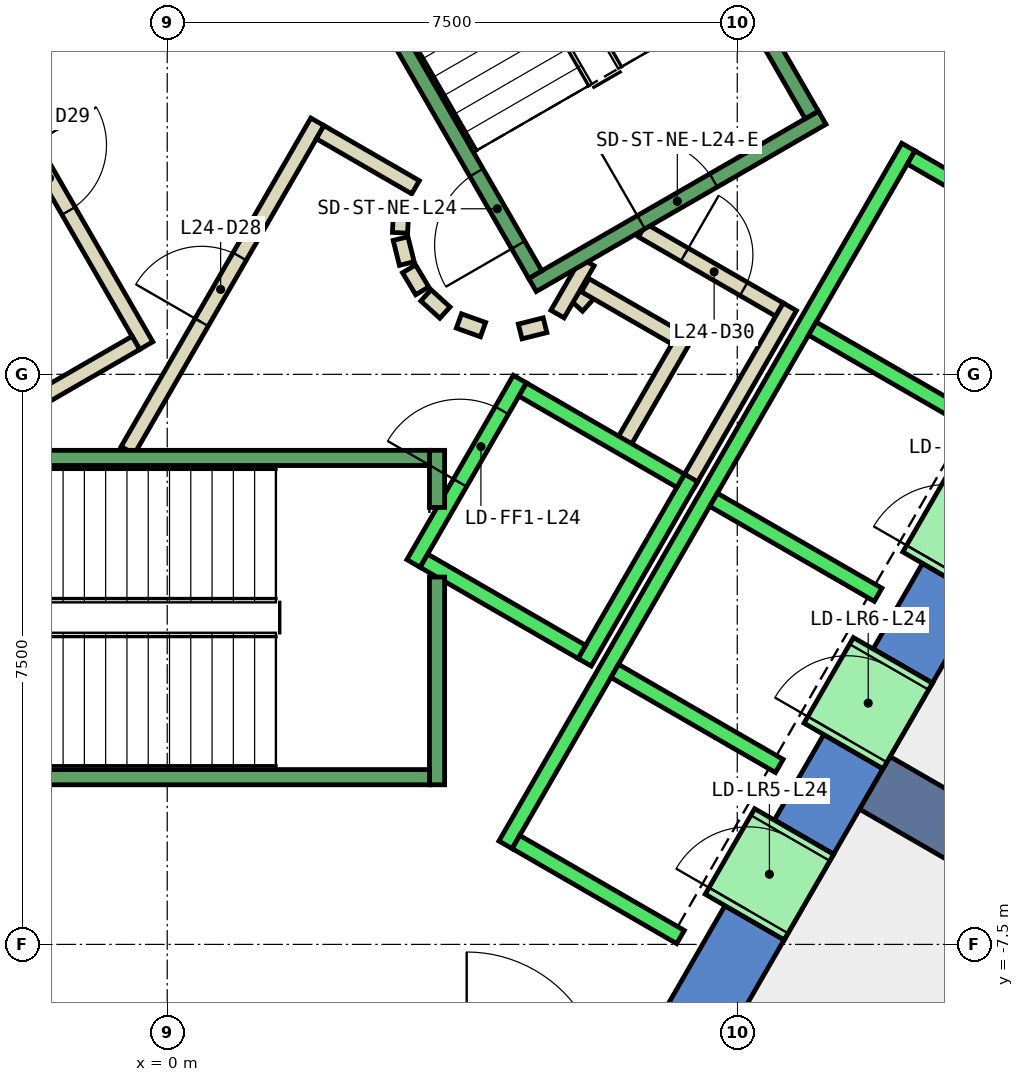
"""IFC4 building model, lengths in metres.
Left out: names, types, materials, properties, quantities, classifications, styles, units other than length and angle.
Written with IfcOpenShell. Run it as: python <this file> out.ifc"""

import sys

from ifc_helpers import new_model, si_unit, direction, frame, frame_2d, origin, place, context, subcontext, project, spatial, polyline, rectangle, outline, extrude, element, fill, save


model = new_model("IFC4")
c1 = context("Model", 3, precision=1e-05, world=origin(), true_north=direction((0.0, 1.0)))
c2 = subcontext(c1, "Body", "Model", "MODEL_VIEW")
j1 = project(units=[si_unit("LENGTHUNIT", "METRE"), si_unit("PLANEANGLEUNIT", "RADIAN")], contexts=[c1])
p1 = place(None, origin())
s1 = spatial("IfcSite", under=j1, at=p1, CompositionType="ELEMENT")
p2 = place(p1, origin())
s2 = spatial("IfcBuilding", under=s1, at=p2, CompositionType="ELEMENT")
p3 = place(p2, frame((0.0, 0.0, 111.8)))
s3 = spatial("IfcBuildingStorey", under=s2, at=p3, CompositionType="ELEMENT", Elevation=111.8)
p4 = place(p3, frame((0.0, 0.0, -0.4)))
e1 = element("IfcWall", 1, at=p4, inside=s3, PredefinedType="SHEAR", context=c2, shape_type="SweptSolid", body=[
    extrude(outline(polyline([(8.517, 11.748), (7.738, 11.298), (12.817, 2.5), (13.856, 2.5), (8.517, 11.748)])), origin(), (0.0, 0.0, 1.0), 4.2),
])
p5 = place(p3, frame((0.0, 0.0, -0.4)))
e2 = element("IfcWall", 2, at=p5, inside=s3, PredefinedType="SHEAR", context=c2, shape_type="SweptSolid", body=[
    extrude(outline(polyline([(8.117, -7.44), (7.338, -6.99), (6.409, -8.6), (6.928, -9.5), (8.117, -7.44)])), origin(), (0.0, 0.0, 1.0), 4.2),
])
p6 = place(p3, frame((0.0, 0.0, -0.4)))
e3 = element("IfcWall", 3, at=p6, inside=s3, PredefinedType="SHEAR", context=c2, shape_type="SweptSolid", body=[
    extrude(outline(polyline([(9.417, -5.189), (8.638, -4.739), (7.988, -5.864), (8.767, -6.314), (9.417, -5.189)])), origin(), (0.0, 0.0, 1.0), 4.2),
])
p7 = place(p3, frame((0.0, 0.0, -0.4)))
e4 = element("IfcWall", 4, at=p7, inside=s3, PredefinedType="SHEAR", context=c2, shape_type="SweptSolid", body=[
    extrude(outline(polyline([(10.717, -2.937), (9.938, -2.487), (9.288, -3.613), (10.067, -4.063), (10.717, -2.937)])), origin(), (0.0, 0.0, 1.0), 4.2),
])
p8 = place(p3, frame((0.0, 0.0, 3.6)))
e5 = element("IfcWall", 5, at=p8, inside=s3, PredefinedType="SHEAR", context=c2, shape_type="SweptSolid", body=[
    extrude(outline(polyline([(8.767, -6.314), (7.988, -5.864), (7.338, -6.99), (8.117, -7.44), (8.767, -6.314)])), origin(), (0.0, 0.0, 1.0), 0.2),
])
p9 = place(p3, frame((0.0, 0.0, 3.6)))
e6 = element("IfcWall", 6, at=p9, inside=s3, PredefinedType="SHEAR", context=c2, shape_type="SweptSolid", body=[
    extrude(outline(polyline([(10.067, -4.063), (9.288, -3.613), (8.638, -4.739), (9.417, -5.189), (10.067, -4.063)])), origin(), (0.0, 0.0, 1.0), 0.2),
])
p10 = place(p3, frame((0.0, 0.0, 3.6)))
e7 = element("IfcWall", 7, at=p10, inside=s3, PredefinedType="SHEAR", context=c2, shape_type="SweptSolid", body=[
    extrude(outline(polyline([(11.367, -1.811), (10.588, -1.361), (9.938, -2.487), (10.717, -2.937), (11.367, -1.811)])), origin(), (0.0, 0.0, 1.0), 0.2),
])
p11 = place(p3, frame((9.31, -5.375, -0.4), z_axis=(0.0, 0.0, 1.0), x_axis=(0.866017533419, -0.500013631625, 0.0)))
e8 = element("IfcWall", 8, at=p11, inside=s3, PredefinedType="SHEAR", context=c2, shape_type="SweptSolid", body=[
    extrude(rectangle(XDim=9.0, YDim=0.8, at=frame_2d((4.5, 0.0))), origin(), (0.0, 0.0, 1.0), 4.2),
])
p12 = place(p3, frame((5.39, 0.898, 0.0), z_axis=(0.0, 0.0, 1.0), x_axis=(0.673828488714, 0.738887791073, 0.0)))
e9 = element("IfcWall", 9, at=p12, inside=s3, PredefinedType="PARTITIONING", context=c2, shape_type="SweptSolid", body=[
    extrude(rectangle(XDim=0.263, YDim=0.2, at=frame_2d((0.131, 0.0))), origin(), (0.0, 0.0, 1.0), 3.8),
])
p13 = place(p3, frame((5.499, 1.172, 0.0), z_axis=(0.0, 0.0, 1.0), x_axis=(0.866333505267, -0.499465972466, 0.0)))
e10 = element("IfcWall", 10, at=p13, inside=s3, PredefinedType="PARTITIONING", context=c2, shape_type="SweptSolid", body=[
    extrude(rectangle(XDim=1.374, YDim=0.2, at=frame_2d((0.687, 0.0))), origin(), (0.0, 0.0, 1.0), 3.8),
])
p14 = place(p3, frame((6.826, 0.522, 0.0), z_axis=(0.0, 0.0, 1.0), x_axis=(-0.500016722714, -0.866015748706, 0.0)))
e11 = element("IfcWall", 11, at=p14, inside=s3, PredefinedType="PARTITIONING", context=c2, shape_type="SweptSolid", body=[
    extrude(rectangle(XDim=1.7, YDim=0.2, at=frame_2d((0.85, 0.0))), origin(), (0.0, 0.0, 1.0), 3.8),
])
p15 = place(p3, frame((6.25, 1.894, 0.0), z_axis=(0.0, 0.0, 1.0), x_axis=(0.866043184279, -0.499969202016, 0.0)))
e12 = element("IfcWall", 12, at=p15, inside=s3, PredefinedType="PARTITIONING", context=c2, shape_type="SweptSolid", body=[
    extrude(rectangle(XDim=2.084, YDim=0.2, at=frame_2d((1.042, 0.0))), origin(), (0.0, 0.0, 1.0), 3.8),
])
p16 = place(p15, frame((0.642, 0.0, 0.0)))
e13 = element("IfcOpeningElement", 13, at=p16, cuts=e12, PredefinedType="OPENING", context=c2, shape_type="SweptSolid", body=[
    extrude(rectangle(XDim=0.9, YDim=2.1, at=frame_2d((0.45, 1.05))), frame((0.0, 0.11, 0.0), z_axis=(0.0, -1.0, 0.0), x_axis=(1.0, 0.0, 0.0)), (0.0, 0.0, 1.0), 0.22),
])
p17 = place(p3, frame((8.192, 0.888, 0.0), z_axis=(0.0, 0.0, 1.0), x_axis=(-0.499940625693, -0.866059680843, 0.0)))
e14 = element("IfcWall", 14, at=p17, inside=s3, PredefinedType="PARTITIONING", context=c2, shape_type="SweptSolid", body=[
    extrude(rectangle(XDim=2.68, YDim=0.2, at=frame_2d((1.34, 0.0))), origin(), (0.0, 0.0, 1.0), 3.8),
])
p18 = place(p3, frame((5.135, 0.793, 0.0), z_axis=(0.0, 0.0, 1.0), x_axis=(0.499526442893, 0.866298639529, 0.0)))
e15 = element("IfcWall", 15, at=p18, inside=s3, PredefinedType="PARTITIONING", context=c2, shape_type="SweptSolid", body=[
    extrude(rectangle(XDim=0.791, YDim=0.2, at=frame_2d((0.396, 0.0))), origin(), (0.0, 0.0, 1.0), 3.8),
])
p19 = place(p3, frame((-0.52, -1.0, 0.0), z_axis=(0.0, 0.0, 1.0), x_axis=(0.50011622646, 0.865958290007, 0.0)))
e16 = element("IfcWall", 16, at=p19, inside=s3, PredefinedType="PARTITIONING", context=c2, shape_type="SweptSolid", body=[
    extrude(rectangle(XDim=4.991, YDim=0.2, at=frame_2d((2.496, 0.0))), origin(), (0.0, 0.0, 1.0), 3.8),
])
p20 = place(p19, frame((1.945, 0.0, 0.0)))
e17 = element("IfcOpeningElement", 17, at=p20, cuts=e16, PredefinedType="OPENING", context=c2, shape_type="SweptSolid", body=[
    extrude(rectangle(XDim=1.0, YDim=2.1, at=frame_2d((0.5, 1.05))), frame((0.0, 0.11, 0.0), z_axis=(0.0, -1.0, 0.0), x_axis=(1.0, 0.0, 0.0)), (0.0, 0.0, 1.0), 0.22),
])
p21 = place(p3, frame((2.012, 3.186, 0.0), z_axis=(0.0, 0.0, 1.0), x_axis=(0.865891012941, -0.500232699559, 0.0)))
e18 = element("IfcWall", 18, at=p21, inside=s3, PredefinedType="PARTITIONING", context=c2, shape_type="SweptSolid", body=[
    extrude(rectangle(XDim=1.449, YDim=0.2, at=frame_2d((0.725, 0.0))), origin(), (0.0, 0.0, 1.0), 3.8),
])
p22 = place(p3, frame((3.079, 2.199, 0.0), z_axis=(0.0, 0.0, 1.0), x_axis=(-0.047771483479, -0.998858290933, 0.0)))
e19 = element("IfcWall", 19, at=p22, inside=s3, PredefinedType="PARTITIONING", context=c2, shape_type="SweptSolid", body=[
    extrude(rectangle(XDim=0.337, YDim=0.2, at=frame_2d((0.169, 0.0))), origin(), (0.0, 0.0, 1.0), 3.8),
])
p23 = place(p3, frame((3.07, 1.786, 0.0), z_axis=(0.0, 0.0, 1.0), x_axis=(0.242705583207, -0.970099994784, 0.0)))
e20 = element("IfcWall", 20, at=p23, inside=s3, PredefinedType="PARTITIONING", context=c2, shape_type="SweptSolid", body=[
    extrude(rectangle(XDim=0.338, YDim=0.2, at=frame_2d((0.169, 0.0))), origin(), (0.0, 0.0, 1.0), 3.8),
])
for number, where, z_axis, x_axis in (
    (21, (3.182, 1.388, 0.0), (0.0, 0.0, 1.0), (0.512, -0.859, 0.0)),
    (22, (3.404, 1.039, 0.0), (0.0, 0.0, 1.0), (0.74, -0.672, 0.0)),
):
    element("IfcWall", number, at=place(p3, frame(where, z_axis=z_axis, x_axis=x_axis)), inside=s3, PredefinedType="PARTITIONING", context=c2, shape_type="SweptSolid", body=[
        extrude(rectangle(XDim=0.338, YDim=0.2, at=frame_2d((0.169, 0.0))), origin(), (0.0, 0.0, 1.0), 3.8),
    ])
p24 = place(p3, frame((3.838, 0.702, 0.0), z_axis=(0.0, 0.0, 1.0), x_axis=(0.941035081519, -0.338308993895, 0.0)))
e23 = element("IfcWall", 23, at=p24, inside=s3, PredefinedType="PARTITIONING", context=c2, shape_type="SweptSolid", body=[
    extrude(rectangle(XDim=0.337, YDim=0.2, at=frame_2d((0.168, 0.0))), origin(), (0.0, 0.0, 1.0), 3.8),
])
p25 = place(p3, frame((4.644, 0.564, 0.0), z_axis=(0.0, 0.0, 1.0), x_axis=(0.969929076366, 0.243387729394, 0.0)))
e24 = element("IfcWall", 24, at=p25, inside=s3, PredefinedType="PARTITIONING", context=c2, shape_type="SweptSolid", body=[
    extrude(rectangle(XDim=0.337, YDim=0.2, at=frame_2d((0.168, 0.0))), origin(), (0.0, 0.0, 1.0), 3.8),
])
p26 = place(p3, frame((-2.771, 4.7, 0.0), z_axis=(0.0, 0.0, 1.0), x_axis=(0.499969479948, -0.866043023828, 0.0)))
e25 = element("IfcWall", 25, at=p26, inside=s3, PredefinedType="PARTITIONING", context=c2, shape_type="SweptSolid", body=[
    extrude(rectangle(XDim=4.99, YDim=0.2, at=frame_2d((2.495, 0.0))), origin(), (0.0, 0.0, 1.0), 3.8),
])
p27 = place(p26, frame((1.945, 0.0, 0.0)))
e26 = element("IfcOpeningElement", 26, at=p27, cuts=e25, PredefinedType="OPENING", context=c2, shape_type="SweptSolid", body=[
    extrude(rectangle(XDim=1.0, YDim=2.1, at=frame_2d((0.5, 1.05))), frame((0.0, 0.11, 0.0), z_axis=(0.0, -1.0, 0.0), x_axis=(1.0, 0.0, 0.0)), (0.0, 0.0, 1.0), 0.22),
])
p28 = place(p3, frame((-0.412, 0.414, 0.0), z_axis=(0.0, 0.0, 1.0), x_axis=(-0.866017369001, -0.500013916395, 0.0)))
e27 = element("IfcWall", 27, at=p28, inside=s3, PredefinedType="PARTITIONING", context=c2, shape_type="SweptSolid", body=[
    extrude(rectangle(XDim=1.45, YDim=0.2, at=frame_2d((0.725, 0.0))), origin(), (0.0, 0.0, 1.0), 3.8),
])
p29 = place(p3, frame((12.401, -7.621, 0.0), z_axis=(0.0, 0.0, 1.0), x_axis=(-0.499983724212, -0.866034800411, 0.0)))
e28 = element("IfcWall", 28, at=p29, inside=s3, PredefinedType="PARTITIONING", context=c2, shape_type="SweptSolid", body=[
    extrude(rectangle(XDim=9.302, YDim=0.2, at=frame_2d((4.651, 0.0))), origin(), (0.0, 0.0, 1.0), 3.8),
])
p30 = place(p3, frame((3.24, -2.488, 0.0), z_axis=(0.0, 0.0, 1.0), x_axis=(0.49994636267, 0.866056369097, 0.0)))
e29 = element("IfcWall", 29, at=p30, inside=s3, PredefinedType="STANDARD", context=c2, shape_type="SweptSolid", body=[
    extrude(rectangle(XDim=2.8, YDim=0.2, at=frame_2d((1.4, 0.0))), origin(), (0.0, 0.0, 1.0), 3.8),
])
p31 = place(p30, frame((1.225, 0.0, 0.0)))
e30 = element("IfcOpeningElement", 30, at=p31, cuts=e29, PredefinedType="OPENING", context=c2, shape_type="SweptSolid", body=[
    extrude(rectangle(XDim=1.1, YDim=2.1, at=frame_2d((0.55, 1.05))), frame((0.0, 0.11, 0.0), z_axis=(0.0, -1.0, 0.0), x_axis=(1.0, 0.0, 0.0)), (0.0, 0.0, 1.0), 0.22),
])
p32 = place(p3, frame((5.492, -3.788, 0.0), z_axis=(0.0, 0.0, 1.0), x_axis=(0.500011755427, 0.866018616679, 0.0)))
e31 = element("IfcWall", 31, at=p32, inside=s3, PredefinedType="STANDARD", context=c2, shape_type="SweptSolid", body=[
    extrude(rectangle(XDim=2.8, YDim=0.2, at=frame_2d((1.4, 0.0))), origin(), (0.0, 0.0, 1.0), 3.8),
])
p33 = place(p3, frame((3.377, -2.452, 0.0), z_axis=(0.0, 0.0, 1.0), x_axis=(0.865955154139, -0.50012165622, 0.0)))
e32 = element("IfcWall", 32, at=p33, inside=s3, PredefinedType="STANDARD", context=c2, shape_type="SweptSolid", body=[
    extrude(rectangle(XDim=2.4, YDim=0.2, at=frame_2d((1.2, 0.0))), origin(), (0.0, 0.0, 1.0), 3.8),
])
p34 = place(p3, frame((4.677, -0.2, 0.0), z_axis=(0.0, 0.0, 1.0), x_axis=(0.865973769406, -0.500089422704, 0.0)))
e33 = element("IfcWall", 33, at=p34, inside=s3, PredefinedType="STANDARD", context=c2, shape_type="SweptSolid", body=[
    extrude(rectangle(XDim=2.399, YDim=0.2, at=frame_2d((1.2, 0.0))), origin(), (0.0, 0.0, 1.0), 3.8),
])
p35 = place(p3, frame((4.451, -6.19, 0.0), z_axis=(0.0, 0.0, 1.0), x_axis=(0.50000090737, 0.866024879913, 0.0)))
e34 = element("IfcWall", 34, at=p35, inside=s3, PredefinedType="STANDARD", context=c2, shape_type="SweptSolid", body=[
    extrude(rectangle(XDim=10.6, YDim=0.2, at=frame_2d((5.3, 0.0))), origin(), (0.0, 0.0, 1.0), 3.8),
])
for number, where, z_axis, x_axis in (
    (35, (4.588, -6.153, 0.0), (0.0, 0.0, 1.0), (0.866, -0.5, 0.0)),
    (36, (5.888, -3.902, 0.0), (0.0, 0.0, 1.0), (0.866, -0.5, 0.0)),
    (37, (7.188, -1.65, 0.0), (0.0, 0.0, 1.0), (0.866, -0.5, 0.0)),
    (38, (8.488, 0.602, 0.0), (0.0, 0.0, 1.0), (0.866, -0.5, 0.0)),
):
    element("IfcWall", number, at=place(p3, frame(where, z_axis=z_axis, x_axis=x_axis)), inside=s3, PredefinedType="STANDARD", context=c2, shape_type="SweptSolid", body=[
        extrude(rectangle(XDim=2.5, YDim=0.2, at=frame_2d((1.25, 0.0))), origin(), (0.0, 0.0, 1.0), 3.8),
    ])
p36 = place(p3, frame((9.788, 2.853, 0.0), z_axis=(0.0, 0.0, 1.0), x_axis=(0.865998541277, -0.500046524342, 0.0)))
e39 = element("IfcWall", 39, at=p36, inside=s3, PredefinedType="STANDARD", context=c2, shape_type="SweptSolid", body=[
    extrude(rectangle(XDim=2.5, YDim=0.2, at=frame_2d((1.25, 0.0))), origin(), (0.0, 0.0, 1.0), 3.8),
])
p37 = place(p3, frame((7.598, -7.14, 0.0), z_axis=(0.0, 0.0, 1.0), x_axis=(0.500362116554, 0.865816234728, 0.0)))
e40 = element("IfcWall", 40, at=p37, inside=s3, PredefinedType="STANDARD", context=c2, shape_type="SweptSolid", body=[
    extrude(rectangle(XDim=1.299, YDim=1.2, at=frame_2d((0.65, 0.0))), origin(), (0.0, 0.0, 1.0), 2.4),
])
p38 = place(p37, frame((0.1, 0.0, 0.0)))
e41 = element("IfcOpeningElement", 41, at=p38, cuts=e40, PredefinedType="OPENING", context=c2, shape_type="SweptSolid", body=[
    extrude(rectangle(XDim=1.1, YDim=2.3, at=frame_2d((0.55, 1.15))), frame((0.0, 0.61, 0.0), z_axis=(0.0, -1.0, 0.0), x_axis=(1.0, 0.0, 0.0)), (0.0, 0.0, 1.0), 1.22),
])
p39 = place(p3, frame((8.898, -4.889, 0.0), z_axis=(0.0, 0.0, 1.0), x_axis=(0.500036693733, 0.866004217611, 0.0)))
e42 = element("IfcWall", 42, at=p39, inside=s3, PredefinedType="STANDARD", context=c2, shape_type="SweptSolid", body=[
    extrude(rectangle(XDim=1.3, YDim=1.2, at=frame_2d((0.65, 0.0))), origin(), (0.0, 0.0, 1.0), 2.4),
])
p40 = place(p39, frame((0.1, 0.0, 0.0)))
e43 = element("IfcOpeningElement", 43, at=p40, cuts=e42, PredefinedType="OPENING", context=c2, shape_type="SweptSolid", body=[
    extrude(rectangle(XDim=1.1, YDim=2.3, at=frame_2d((0.55, 1.15))), frame((0.0, 0.61, 0.0), z_axis=(0.0, -1.0, 0.0), x_axis=(1.0, 0.0, 0.0)), (0.0, 0.0, 1.0), 1.22),
])
p41 = place(p3, frame((10.198, -2.637, 0.0), z_axis=(0.0, 0.0, 1.0), x_axis=(0.49989585183, 0.866085525409, 0.0)))
e44 = element("IfcWall", 44, at=p41, inside=s3, PredefinedType="STANDARD", context=c2, shape_type="SweptSolid", body=[
    extrude(rectangle(XDim=1.3, YDim=1.2, at=frame_2d((0.65, 0.0))), origin(), (0.0, 0.0, 1.0), 2.4),
])
p42 = place(p41, frame((0.1, 0.0, 0.0)))
e45 = element("IfcOpeningElement", 45, at=p42, cuts=e44, PredefinedType="OPENING", context=c2, shape_type="SweptSolid", body=[
    extrude(rectangle(XDim=1.1, YDim=2.3, at=frame_2d((0.55, 1.15))), frame((0.0, 0.61, 0.0), z_axis=(0.0, -1.0, 0.0), x_axis=(1.0, 0.0, 0.0)), (0.0, 0.0, 1.0), 1.22),
])
p43 = place(p3, frame((3.55, -2.667, 0.0), z_axis=(0.0, 0.0, 1.0), x_axis=(0.0, -1.0, 0.0)))
e46 = element("IfcWall", 46, at=p43, inside=s3, PredefinedType="STANDARD", context=c2, shape_type="SweptSolid", body=[
    extrude(rectangle(XDim=2.733, YDim=0.2, at=frame_2d((1.366, 0.0))), origin(), (0.0, 0.0, 1.0), 3.8),
])
p44 = place(p3, frame((3.55, -1.0, 0.0), z_axis=(0.0, 0.0, 1.0), x_axis=(0.0, -1.0, 0.0)))
e47 = element("IfcWall", 47, at=p44, inside=s3, PredefinedType="STANDARD", context=c2, shape_type="SweptSolid", body=[
    extrude(rectangle(XDim=0.751, YDim=0.2, at=frame_2d((0.375, 0.0))), origin(), (0.0, 0.0, 1.0), 3.8),
])
p45 = place(p3, frame((-3.45, -1.1, 0.0), z_axis=(0.0, 0.0, 1.0), x_axis=(1.0, 0.0, 0.0)))
e48 = element("IfcWall", 48, at=p45, inside=s3, PredefinedType="STANDARD", context=c2, shape_type="SweptSolid", body=[
    extrude(rectangle(XDim=6.9, YDim=0.2, at=frame_2d((3.45, 0.0))), origin(), (0.0, 0.0, 1.0), 3.8),
])
p46 = place(p45, frame((0.45, 0.0, 0.0)))
e49 = element("IfcOpeningElement", 49, at=p46, cuts=e48, PredefinedType="OPENING", context=c2, shape_type="SweptSolid", body=[
    extrude(rectangle(XDim=1.1, YDim=2.2, at=frame_2d((0.55, 1.1))), frame((0.0, 0.11, 0.0), z_axis=(0.0, -1.0, 0.0), x_axis=(1.0, 0.0, 0.0)), (0.0, 0.0, 1.0), 0.22),
])
p47 = place(p3, frame((-3.45, -5.3, 0.0), z_axis=(0.0, 0.0, 1.0), x_axis=(1.0, 0.0, 0.0)))
e50 = element("IfcWall", 50, at=p47, inside=s3, PredefinedType="STANDARD", context=c2, shape_type="SweptSolid", body=[
    extrude(rectangle(XDim=6.9, YDim=0.2, at=frame_2d((3.45, 0.0))), origin(), (0.0, 0.0, 1.0), 3.8),
])
p48 = place(p3, frame((4.806, 1.176, 0.0), z_axis=(0.0, 0.0, 1.0), x_axis=(0.866059941101, 0.499940174841, 0.0)))
e51 = element("IfcWall", 51, at=p48, inside=s3, PredefinedType="STANDARD", context=c2, shape_type="SweptSolid", body=[
    extrude(rectangle(XDim=4.4, YDim=0.2, at=frame_2d((2.2, 0.0))), origin(), (0.0, 0.0, 1.0), 3.8),
])
p49 = place(p48, frame((1.65, 0.0, 0.0)))
e52 = element("IfcOpeningElement", 52, at=p49, cuts=e51, PredefinedType="OPENING", context=c2, shape_type="SweptSolid", body=[
    extrude(rectangle(XDim=1.1, YDim=2.2, at=frame_2d((0.55, 1.1))), frame((0.0, 0.11, 0.0), z_axis=(0.0, -1.0, 0.0), x_axis=(1.0, 0.0, 0.0)), (0.0, 0.0, 1.0), 0.22),
])
p50 = place(p3, frame((4.843, 1.312, 0.0), z_axis=(0.0, 0.0, 1.0), x_axis=(-0.499963383562, 0.866046543262, 0.0)))
e53 = element("IfcWall", 53, at=p50, inside=s3, PredefinedType="STANDARD", context=c2, shape_type="SweptSolid", body=[
    extrude(rectangle(XDim=6.9, YDim=0.2, at=frame_2d((3.45, 0.0))), origin(), (0.0, 0.0, 1.0), 3.8),
])
p51 = place(p50, frame((0.45, 0.0, 0.0)))
e54 = element("IfcOpeningElement", 54, at=p51, cuts=e53, PredefinedType="OPENING", context=c2, shape_type="SweptSolid", body=[
    extrude(rectangle(XDim=1.1, YDim=2.2, at=frame_2d((0.55, 1.1))), frame((0.0, 0.11, 0.0), z_axis=(0.0, -1.0, 0.0), x_axis=(1.0, 0.0, 0.0)), (0.0, 0.0, 1.0), 0.22),
])
p52 = place(p3, frame((8.48, 3.412, 0.0), z_axis=(0.0, 0.0, 1.0), x_axis=(-0.499978703459, 0.866037698999, 0.0)))
e55 = element("IfcWall", 55, at=p52, inside=s3, PredefinedType="STANDARD", context=c2, shape_type="SweptSolid", body=[
    extrude(rectangle(XDim=6.9, YDim=0.2, at=frame_2d((3.45, 0.0))), origin(), (0.0, 0.0, 1.0), 3.8),
])
p53 = place(p3, frame((-1.393, 7.288, 0.0), z_axis=(0.0, 0.0, 1.0), x_axis=(-0.499963383562, -0.866046543262, 0.0)))
e56 = element("IfcWall", 56, at=p53, inside=s3, PredefinedType="STANDARD", context=c2, shape_type="SweptSolid", body=[
    extrude(rectangle(XDim=6.9, YDim=0.2, at=frame_2d((3.45, 0.0))), origin(), (0.0, 0.0, 1.0), 3.8),
])
p54 = place(p53, frame((0.45, 0.0, 0.0)))
e57 = element("IfcOpeningElement", 57, at=p54, cuts=e56, PredefinedType="OPENING", context=c2, shape_type="SweptSolid", body=[
    extrude(rectangle(XDim=1.1, YDim=2.2, at=frame_2d((0.55, 1.1))), frame((0.0, 0.11, 0.0), z_axis=(0.0, -1.0, 0.0), x_axis=(1.0, 0.0, 0.0)), (0.0, 0.0, 1.0), 0.22),
])
p55 = place(p20, origin())
e58 = element("IfcDoor", 58, at=p55, inside=s3, OperationType="SINGLE_SWING_LEFT", PredefinedType="DOOR", context=c2, shape_type="SweptSolid", body=[
    extrude(rectangle(XDim=1.0, YDim=2.1, at=frame_2d((0.5, 1.05))), frame((0.0, 0.025, 0.0), z_axis=(0.0, -1.0, 0.0), x_axis=(1.0, 0.0, 0.0)), (0.0, 0.0, 1.0), 0.05),
])
fill(e17, e58)
p56 = place(p27, origin())
e59 = element("IfcDoor", 59, at=p56, inside=s3, OperationType="SINGLE_SWING_RIGHT", PredefinedType="DOOR", context=c2, shape_type="SweptSolid", body=[
    extrude(rectangle(XDim=1.0, YDim=2.1, at=frame_2d((0.5, 1.05))), frame((0.0, 0.025, 0.0), z_axis=(0.0, -1.0, 0.0), x_axis=(1.0, 0.0, 0.0)), (0.0, 0.0, 1.0), 0.05),
])
fill(e26, e59)
p57 = place(p16, origin())
e60 = element("IfcDoor", 60, at=p57, inside=s3, OperationType="SINGLE_SWING_LEFT", PredefinedType="DOOR", context=c2, shape_type="SweptSolid", body=[
    extrude(rectangle(XDim=0.9, YDim=2.1, at=frame_2d((0.45, 1.05))), frame((0.0, 0.025, 0.0), z_axis=(0.0, -1.0, 0.0), x_axis=(1.0, 0.0, 0.0)), (0.0, 0.0, 1.0), 0.05),
])
fill(e13, e60)
p58 = place(p38, origin())
e61 = element("IfcDoor", 61, at=p58, inside=s3, OperationType="SLIDING_TO_LEFT", PredefinedType="DOOR", context=c2, shape_type="SweptSolid", body=[
    extrude(rectangle(XDim=1.1, YDim=2.3, at=frame_2d((0.55, 1.15))), frame((0.0, 0.025, 0.0), z_axis=(0.0, -1.0, 0.0), x_axis=(1.0, 0.0, 0.0)), (0.0, 0.0, 1.0), 0.05),
])
fill(e41, e61)
p59 = place(p40, origin())
e62 = element("IfcDoor", 62, at=p59, inside=s3, OperationType="SLIDING_TO_LEFT", PredefinedType="DOOR", context=c2, shape_type="SweptSolid", body=[
    extrude(rectangle(XDim=1.1, YDim=2.3, at=frame_2d((0.55, 1.15))), frame((0.0, 0.025, 0.0), z_axis=(0.0, -1.0, 0.0), x_axis=(1.0, 0.0, 0.0)), (0.0, 0.0, 1.0), 0.05),
])
fill(e43, e62)
p60 = place(p31, origin())
e63 = element("IfcDoor", 63, at=p60, inside=s3, OperationType="SLIDING_TO_LEFT", PredefinedType="DOOR", context=c2, shape_type="SweptSolid", body=[
    extrude(rectangle(XDim=1.1, YDim=2.1, at=frame_2d((0.55, 1.05))), frame((0.0, 0.025, 0.0), z_axis=(0.0, -1.0, 0.0), x_axis=(1.0, 0.0, 0.0)), (0.0, 0.0, 1.0), 0.05),
])
fill(e30, e63)
p61 = place(p51, origin())
e64 = element("IfcDoor", 64, at=p61, inside=s3, OperationType="SINGLE_SWING_LEFT", PredefinedType="DOOR", context=c2, shape_type="SweptSolid", body=[
    extrude(rectangle(XDim=1.1, YDim=2.2, at=frame_2d((0.55, 1.1))), frame((0.0, 0.025, 0.0), z_axis=(0.0, -1.0, 0.0), x_axis=(1.0, 0.0, 0.0)), (0.0, 0.0, 1.0), 0.05),
])
fill(e54, e64)
p62 = place(p49, origin())
e65 = element("IfcDoor", 65, at=p62, inside=s3, OperationType="SINGLE_SWING_LEFT", PredefinedType="DOOR", context=c2, shape_type="SweptSolid", body=[
    extrude(rectangle(XDim=1.1, YDim=2.2, at=frame_2d((0.55, 1.1))), frame((0.0, 0.025, 0.0), z_axis=(0.0, -1.0, 0.0), x_axis=(1.0, 0.0, 0.0)), (0.0, 0.0, 1.0), 0.05),
])
fill(e52, e65)
save(model, sys.argv[1])
